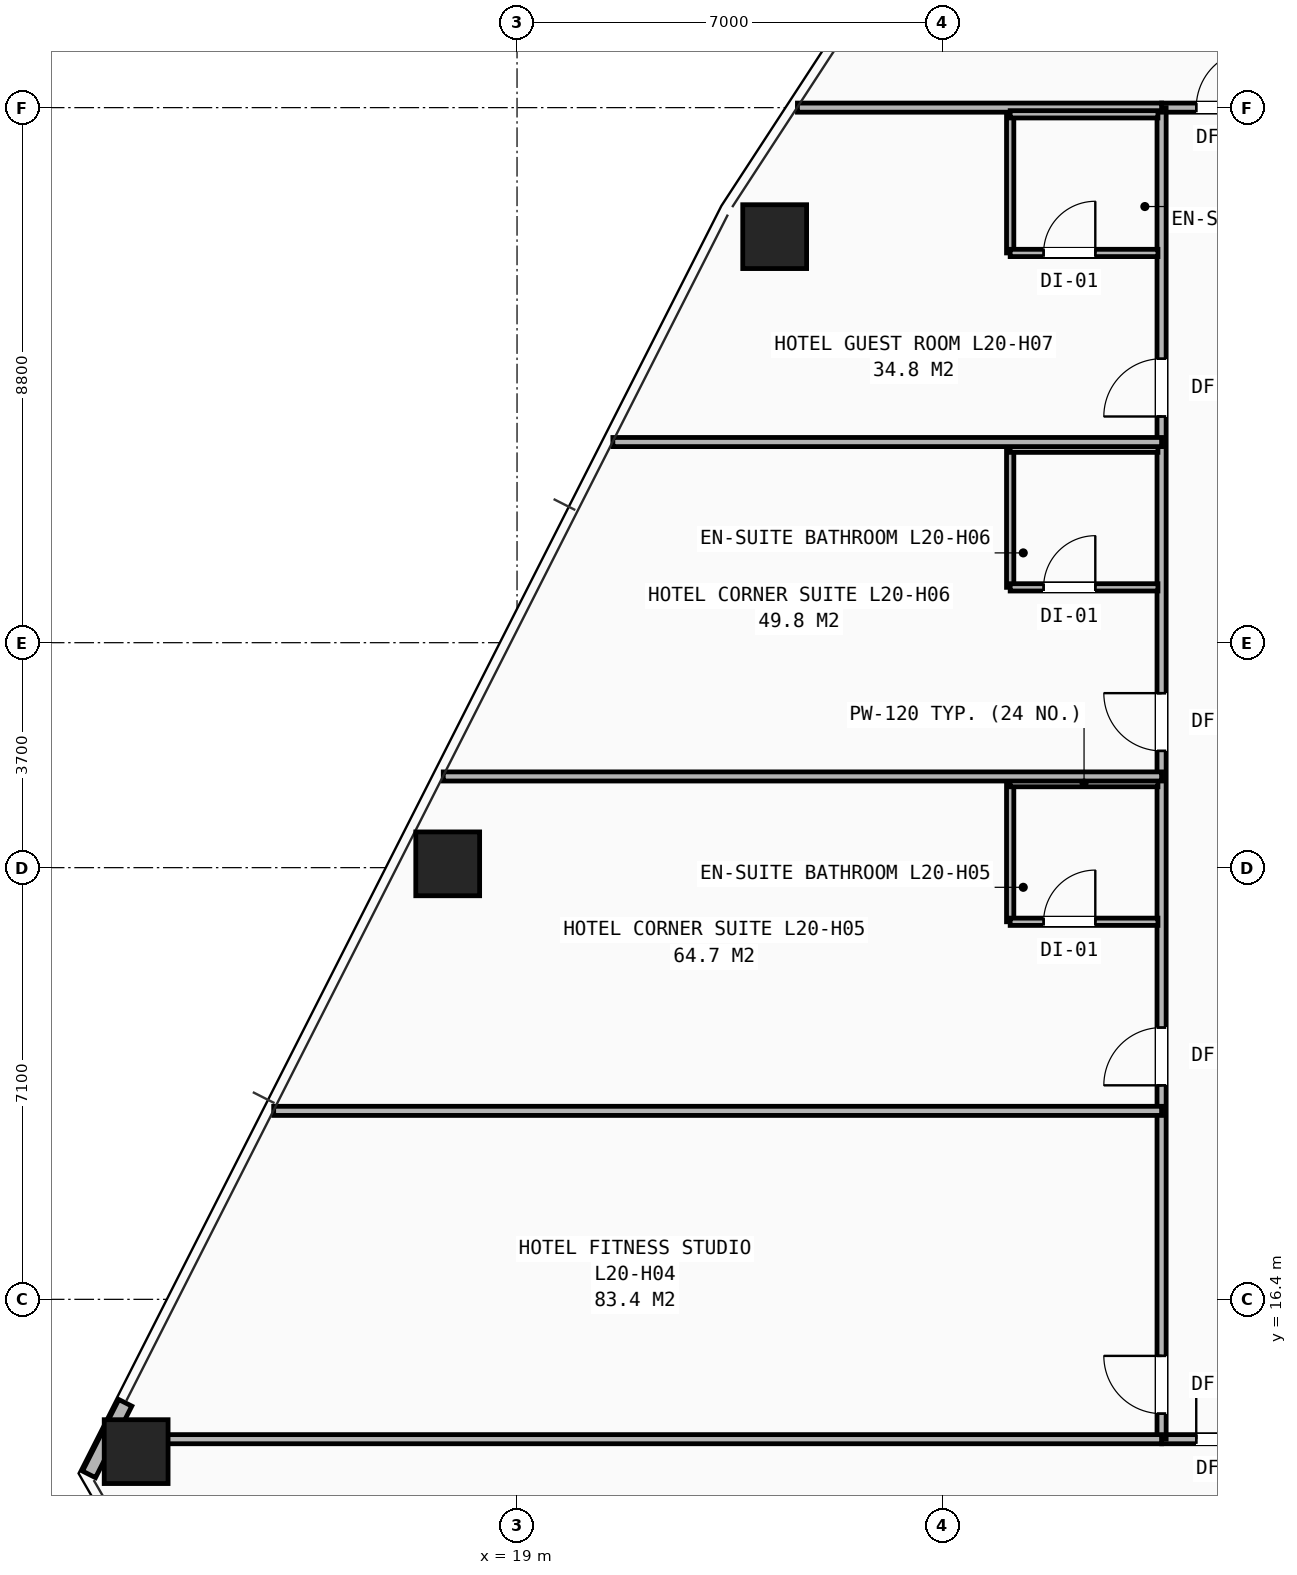
"""IFC4 building model, lengths in metres.
Left out: names, types, materials, properties, quantities, classifications, styles, units other than length and angle.
Written with IfcOpenShell. Run it as: python <this file> out.ifc"""

import sys

from ifc_helpers import new_model, si_unit, direction, frame, frame_2d, origin, origin_2d, place, context, subcontext, project, spatial, rectangle, hollow_rectangle, extrude, element, fill, save


model = new_model("IFC4")
c1 = context("Model", 3, precision=1e-05, world=origin(), true_north=direction((0.0, 1.0)))
c2 = subcontext(c1, "Body", "Model", "MODEL_VIEW")
j1 = project(units=[si_unit("LENGTHUNIT", "METRE"), si_unit("PLANEANGLEUNIT", "RADIAN")], contexts=[c1])
p1 = place(None, origin())
s1 = spatial("IfcSite", under=j1, at=p1, CompositionType="ELEMENT")
p2 = place(p1, origin())
s2 = spatial("IfcBuilding", under=s1, at=p2, CompositionType="ELEMENT")
p3 = place(p2, frame((0.0, 0.0, 73.4)))
s3 = spatial("IfcBuildingStorey", under=s2, at=p3, CompositionType="ELEMENT", Elevation=73.4)
for number, where, z_axis, x_axis in (
    (1, (23.237, 33.878, 0.0), (0.0, 0.0, 1.0), (1.0, 0.0, 0.0)),
    (2, (17.86, 23.563, 0.0), (0.0, 0.0, 1.0), (1.0, 0.0, 0.0)),
    (3, (12.736, 13.896, 0.0), (0.0, 0.0, 1.0), (1.0, 0.0, 0.0)),
):
    element("IfcColumn", number, at=place(p3, frame(where, z_axis=z_axis, x_axis=x_axis)), inside=s3, PredefinedType="COLUMN", context=c2, shape_type="SweptSolid", body=[
        extrude(hollow_rectangle(XDim=1.05, YDim=1.05, WallThickness=0.07, at=origin_2d()), origin(), (0.0, 0.0, 1.0), 3.2),
    ])
p4 = place(p3, frame((12.557, 14.698, 0.0), z_axis=(0.0, 0.0, 1.0), x_axis=(-0.452239623624, -0.891896475396, 0.0)))
e4 = element("IfcWall", 4, at=p4, inside=s3, PredefinedType="SHEAR", context=c2, shape_type="SweptSolid", body=[
    extrude(rectangle(XDim=1.319, YDim=0.24, at=frame_2d((0.66, 0.0))), origin(), (0.0, 0.0, 1.0), 2.253),
])
p5 = place(p3, frame((29.6, 14.1, 0.0), z_axis=(0.0, 0.0, 1.0), x_axis=(1.0, 0.0, 0.0)))
e5 = element("IfcWall", 5, at=p5, inside=s3, PredefinedType="PARTITIONING", context=c2, shape_type="SweptSolid", body=[
    extrude(rectangle(XDim=20.8, YDim=0.15, at=frame_2d((10.4, 0.0))), origin(), (0.0, 0.0, 1.0), 2.421),
])
p6 = place(p5, frame((0.57, 0.0, 0.0)))
e6 = element("IfcOpeningElement", 6, at=p6, cuts=e5, PredefinedType="OPENING", context=c2, shape_type="SweptSolid", body=[
    extrude(rectangle(XDim=0.95, YDim=2.1, at=frame_2d((0.475, 1.05))), frame((0.0, 0.085, 0.0), z_axis=(0.0, -1.0, 0.0), x_axis=(1.0, 0.0, 0.0)), (0.0, 0.0, 1.0), 0.17),
])
p7 = place(p5, frame((5.82, 0.0, 0.0)))
e7 = element("IfcOpeningElement", 7, at=p7, cuts=e5, PredefinedType="OPENING", context=c2, shape_type="SweptSolid", body=[
    extrude(rectangle(XDim=0.95, YDim=2.1, at=frame_2d((0.475, 1.05))), frame((0.0, 0.085, 0.0), z_axis=(0.0, -1.0, 0.0), x_axis=(1.0, 0.0, 0.0)), (0.0, 0.0, 1.0), 0.17),
])
p8 = place(p5, frame((15.02, 0.0, 0.0)))
e8 = element("IfcOpeningElement", 8, at=p8, cuts=e5, PredefinedType="OPENING", context=c2, shape_type="SweptSolid", body=[
    extrude(rectangle(XDim=0.95, YDim=2.1, at=frame_2d((0.475, 1.05))), frame((0.0, 0.085, 0.0), z_axis=(0.0, -1.0, 0.0), x_axis=(1.0, 0.0, 0.0)), (0.0, 0.0, 1.0), 0.17),
])
p9 = place(p3, frame((29.6, 36.0, 0.0), z_axis=(0.0, 0.0, 1.0), x_axis=(1.0, 0.0, 0.0)))
e9 = element("IfcWall", 9, at=p9, inside=s3, PredefinedType="PARTITIONING", context=c2, shape_type="SweptSolid", body=[
    extrude(rectangle(XDim=9.65, YDim=0.15, at=frame_2d((4.825, 0.0))), origin(), (0.0, 0.0, 1.0), 2.97),
])
p10 = place(p9, frame((0.57, 0.0, 0.0)))
e10 = element("IfcOpeningElement", 10, at=p10, cuts=e9, PredefinedType="OPENING", context=c2, shape_type="SweptSolid", body=[
    extrude(rectangle(XDim=0.95, YDim=2.1, at=frame_2d((0.475, 1.05))), frame((0.0, 0.085, 0.0), z_axis=(0.0, -1.0, 0.0), x_axis=(1.0, 0.0, 0.0)), (0.0, 0.0, 1.0), 0.17),
])
p11 = place(p9, frame((7.02, 0.0, 0.0)))
e11 = element("IfcOpeningElement", 11, at=p11, cuts=e9, PredefinedType="OPENING", context=c2, shape_type="SweptSolid", body=[
    extrude(rectangle(XDim=0.95, YDim=2.1, at=frame_2d((0.475, 1.05))), frame((0.0, 0.085, 0.0), z_axis=(0.0, -1.0, 0.0), x_axis=(1.0, 0.0, 0.0)), (0.0, 0.0, 1.0), 0.17),
])
p12 = place(p3, frame((29.6, 14.1, 0.0), z_axis=(0.0, 0.0, 1.0), x_axis=(0.0, 1.0, 0.0)))
e12 = element("IfcWall", 12, at=p12, inside=s3, PredefinedType="PARTITIONING", context=c2, shape_type="SweptSolid", body=[
    extrude(rectangle(XDim=21.9, YDim=0.15, at=frame_2d((10.95, 0.0))), origin(), (0.0, 0.0, 1.0), 2.421),
])
p13 = place(p12, frame((0.42, 0.0, 0.0)))
e13 = element("IfcOpeningElement", 13, at=p13, cuts=e12, PredefinedType="OPENING", context=c2, shape_type="SweptSolid", body=[
    extrude(rectangle(XDim=0.95, YDim=2.1, at=frame_2d((0.475, 1.05))), frame((0.0, 0.085, 0.0), z_axis=(0.0, -1.0, 0.0), x_axis=(1.0, 0.0, 0.0)), (0.0, 0.0, 1.0), 0.17),
])
p14 = place(p12, frame((5.82, 0.0, 0.0)))
e14 = element("IfcOpeningElement", 14, at=p14, cuts=e12, PredefinedType="OPENING", context=c2, shape_type="SweptSolid", body=[
    extrude(rectangle(XDim=0.95, YDim=2.1, at=frame_2d((0.475, 1.05))), frame((0.0, 0.085, 0.0), z_axis=(0.0, -1.0, 0.0), x_axis=(1.0, 0.0, 0.0)), (0.0, 0.0, 1.0), 0.17),
])
p15 = place(p12, frame((11.32, 0.0, 0.0)))
e15 = element("IfcOpeningElement", 15, at=p15, cuts=e12, PredefinedType="OPENING", context=c2, shape_type="SweptSolid", body=[
    extrude(rectangle(XDim=0.95, YDim=2.1, at=frame_2d((0.475, 1.05))), frame((0.0, 0.085, 0.0), z_axis=(0.0, -1.0, 0.0), x_axis=(1.0, 0.0, 0.0)), (0.0, 0.0, 1.0), 0.17),
])
p16 = place(p12, frame((16.82, 0.0, 0.0)))
e16 = element("IfcOpeningElement", 16, at=p16, cuts=e12, PredefinedType="OPENING", context=c2, shape_type="SweptSolid", body=[
    extrude(rectangle(XDim=0.95, YDim=2.1, at=frame_2d((0.475, 1.05))), frame((0.0, 0.085, 0.0), z_axis=(0.0, -1.0, 0.0), x_axis=(1.0, 0.0, 0.0)), (0.0, 0.0, 1.0), 0.17),
])
p17 = place(p3, frame((12.26, 14.1, 0.0), z_axis=(0.0, 0.0, 1.0), x_axis=(1.0, 0.0, 0.0)))
e17 = element("IfcWall", 17, at=p17, inside=s3, PredefinedType="PARTITIONING", context=c2, shape_type="SweptSolid", body=[
    extrude(rectangle(XDim=17.341, YDim=0.15, at=frame_2d((8.67, 0.0))), origin(), (0.0, 0.0, 1.0), 2.258),
])
p18 = place(p3, frame((23.611, 36.0, 0.0), z_axis=(0.0, 0.0, 1.0), x_axis=(1.0, 0.0, 0.0)))
e18 = element("IfcWall", 18, at=p18, inside=s3, PredefinedType="PARTITIONING", context=c2, shape_type="SweptSolid", body=[
    extrude(rectangle(XDim=5.989, YDim=0.15, at=frame_2d((2.994, 0.0))), origin(), (0.0, 0.0, 1.0), 2.258),
])
p19 = place(p3, frame((14.998, 19.5, 0.0), z_axis=(0.0, 0.0, 1.0), x_axis=(1.0, 0.0, 0.0)))
e19 = element("IfcWall", 19, at=p19, inside=s3, PredefinedType="PARTITIONING", context=c2, shape_type="SweptSolid", body=[
    extrude(rectangle(XDim=14.602, YDim=0.15, at=frame_2d((7.301, 0.0))), origin(), (0.0, 0.0, 1.0), 2.258),
])
p20 = place(p3, frame((27.11, 22.61, 0.0), z_axis=(0.0, 0.0, 1.0), x_axis=(0.0, 1.0, 0.0)))
e20 = element("IfcWall", 20, at=p20, inside=s3, PredefinedType="PARTITIONING", context=c2, shape_type="SweptSolid", body=[
    extrude(rectangle(XDim=2.28, YDim=0.12, at=frame_2d((1.14, 0.0))), origin(), (0.0, 0.0, 1.0), 2.97),
])
p21 = place(p3, frame((27.11, 22.61, 0.0), z_axis=(0.0, 0.0, 1.0), x_axis=(1.0, 0.0, 0.0)))
e21 = element("IfcWall", 21, at=p21, inside=s3, PredefinedType="PARTITIONING", context=c2, shape_type="SweptSolid", body=[
    extrude(rectangle(XDim=2.43, YDim=0.12, at=frame_2d((1.215, 0.0))), origin(), (0.0, 0.0, 1.0), 2.97),
])
p22 = place(p21, frame((0.55, 0.0, 0.0)))
e22 = element("IfcOpeningElement", 22, at=p22, cuts=e21, PredefinedType="OPENING", context=c2, shape_type="SweptSolid", body=[
    extrude(rectangle(XDim=0.85, YDim=2.05, at=frame_2d((0.425, 1.025))), frame((0.0, 0.07, 0.0), z_axis=(0.0, -1.0, 0.0), x_axis=(1.0, 0.0, 0.0)), (0.0, 0.0, 1.0), 0.14),
])
p23 = place(p3, frame((27.11, 24.89, 0.0), z_axis=(0.0, 0.0, 1.0), x_axis=(1.0, 0.0, 0.0)))
e23 = element("IfcWall", 23, at=p23, inside=s3, PredefinedType="PARTITIONING", context=c2, shape_type="SweptSolid", body=[
    extrude(rectangle(XDim=2.43, YDim=0.12, at=frame_2d((1.215, 0.0))), origin(), (0.0, 0.0, 1.0), 2.97),
])
p24 = place(p3, frame((17.787, 25.0, 0.0), z_axis=(0.0, 0.0, 1.0), x_axis=(1.0, 0.0, 0.0)))
e24 = element("IfcWall", 24, at=p24, inside=s3, PredefinedType="PARTITIONING", context=c2, shape_type="SweptSolid", body=[
    extrude(rectangle(XDim=11.813, YDim=0.15, at=frame_2d((5.907, 0.0))), origin(), (0.0, 0.0, 1.0), 2.258),
])
p25 = place(p3, frame((27.11, 28.11, 0.0), z_axis=(0.0, 0.0, 1.0), x_axis=(0.0, 1.0, 0.0)))
e25 = element("IfcWall", 25, at=p25, inside=s3, PredefinedType="PARTITIONING", context=c2, shape_type="SweptSolid", body=[
    extrude(rectangle(XDim=2.28, YDim=0.12, at=frame_2d((1.14, 0.0))), origin(), (0.0, 0.0, 1.0), 2.97),
])
p26 = place(p3, frame((27.11, 28.11, 0.0), z_axis=(0.0, 0.0, 1.0), x_axis=(1.0, 0.0, 0.0)))
e26 = element("IfcWall", 26, at=p26, inside=s3, PredefinedType="PARTITIONING", context=c2, shape_type="SweptSolid", body=[
    extrude(rectangle(XDim=2.43, YDim=0.12, at=frame_2d((1.215, 0.0))), origin(), (0.0, 0.0, 1.0), 2.97),
])
p27 = place(p26, frame((0.55, 0.0, 0.0)))
e27 = element("IfcOpeningElement", 27, at=p27, cuts=e26, PredefinedType="OPENING", context=c2, shape_type="SweptSolid", body=[
    extrude(rectangle(XDim=0.85, YDim=2.05, at=frame_2d((0.425, 1.025))), frame((0.0, 0.07, 0.0), z_axis=(0.0, -1.0, 0.0), x_axis=(1.0, 0.0, 0.0)), (0.0, 0.0, 1.0), 0.14),
])
p28 = place(p3, frame((27.11, 30.39, 0.0), z_axis=(0.0, 0.0, 1.0), x_axis=(1.0, 0.0, 0.0)))
e28 = element("IfcWall", 28, at=p28, inside=s3, PredefinedType="PARTITIONING", context=c2, shape_type="SweptSolid", body=[
    extrude(rectangle(XDim=2.43, YDim=0.12, at=frame_2d((1.215, 0.0))), origin(), (0.0, 0.0, 1.0), 2.97),
])
p29 = place(p3, frame((20.576, 30.5, 0.0), z_axis=(0.0, 0.0, 1.0), x_axis=(1.0, 0.0, 0.0)))
e29 = element("IfcWall", 29, at=p29, inside=s3, PredefinedType="PARTITIONING", context=c2, shape_type="SweptSolid", body=[
    extrude(rectangle(XDim=9.024, YDim=0.15, at=frame_2d((4.512, 0.0))), origin(), (0.0, 0.0, 1.0), 2.258),
])
p30 = place(p3, frame((27.11, 33.61, 0.0), z_axis=(0.0, 0.0, 1.0), x_axis=(0.0, 1.0, 0.0)))
e30 = element("IfcWall", 30, at=p30, inside=s3, PredefinedType="PARTITIONING", context=c2, shape_type="SweptSolid", body=[
    extrude(rectangle(XDim=2.28, YDim=0.12, at=frame_2d((1.14, 0.0))), origin(), (0.0, 0.0, 1.0), 2.503),
])
p31 = place(p3, frame((27.11, 33.61, 0.0), z_axis=(0.0, 0.0, 1.0), x_axis=(1.0, 0.0, 0.0)))
e31 = element("IfcWall", 31, at=p31, inside=s3, PredefinedType="PARTITIONING", context=c2, shape_type="SweptSolid", body=[
    extrude(rectangle(XDim=2.43, YDim=0.12, at=frame_2d((1.215, 0.0))), origin(), (0.0, 0.0, 1.0), 2.503),
])
p32 = place(p31, frame((0.55, 0.0, 0.0)))
e32 = element("IfcOpeningElement", 32, at=p32, cuts=e31, PredefinedType="OPENING", context=c2, shape_type="SweptSolid", body=[
    extrude(rectangle(XDim=0.85, YDim=2.05, at=frame_2d((0.425, 1.025))), frame((0.0, 0.07, 0.0), z_axis=(0.0, -1.0, 0.0), x_axis=(1.0, 0.0, 0.0)), (0.0, 0.0, 1.0), 0.14),
])
p33 = place(p3, frame((27.11, 35.89, 0.0), z_axis=(0.0, 0.0, 1.0), x_axis=(1.0, 0.0, 0.0)))
e33 = element("IfcWall", 33, at=p33, inside=s3, PredefinedType="PARTITIONING", context=c2, shape_type="SweptSolid", body=[
    extrude(rectangle(XDim=2.43, YDim=0.12, at=frame_2d((1.215, 0.0))), origin(), (0.0, 0.0, 1.0), 2.503),
])
p34 = place(p6, origin())
e34 = element("IfcDoor", 34, at=p34, inside=s3, OperationType="SINGLE_SWING_LEFT", PredefinedType="DOOR", context=c2, shape_type="SweptSolid", body=[
    extrude(rectangle(XDim=0.95, YDim=2.1, at=frame_2d((0.475, 1.05))), frame((0.0, 0.025, 0.0), z_axis=(0.0, -1.0, 0.0), x_axis=(1.0, 0.0, 0.0)), (0.0, 0.0, 1.0), 0.05),
])
fill(e6, e34)
p35 = place(p13, origin())
e35 = element("IfcDoor", 35, at=p35, inside=s3, OperationType="SINGLE_SWING_RIGHT", PredefinedType="DOOR", context=c2, shape_type="SweptSolid", body=[
    extrude(rectangle(XDim=0.95, YDim=2.1, at=frame_2d((0.475, 1.05))), frame((0.0, 0.025, 0.0), z_axis=(0.0, -1.0, 0.0), x_axis=(1.0, 0.0, 0.0)), (0.0, 0.0, 1.0), 0.05),
])
fill(e13, e35)
p36 = place(p14, origin())
e36 = element("IfcDoor", 36, at=p36, inside=s3, OperationType="SINGLE_SWING_LEFT", PredefinedType="DOOR", context=c2, shape_type="SweptSolid", body=[
    extrude(rectangle(XDim=0.95, YDim=2.1, at=frame_2d((0.475, 1.05))), frame((0.0, 0.025, 0.0), z_axis=(0.0, -1.0, 0.0), x_axis=(1.0, 0.0, 0.0)), (0.0, 0.0, 1.0), 0.05),
])
fill(e14, e36)
p37 = place(p22, origin())
e37 = element("IfcDoor", 37, at=p37, inside=s3, OperationType="SINGLE_SWING_RIGHT", PredefinedType="DOOR", context=c2, shape_type="SweptSolid", body=[
    extrude(rectangle(XDim=0.85, YDim=2.05, at=frame_2d((0.425, 1.025))), frame((0.0, 0.025, 0.0), z_axis=(0.0, -1.0, 0.0), x_axis=(1.0, 0.0, 0.0)), (0.0, 0.0, 1.0), 0.05),
])
fill(e22, e37)
p38 = place(p15, origin())
e38 = element("IfcDoor", 38, at=p38, inside=s3, OperationType="SINGLE_SWING_RIGHT", PredefinedType="DOOR", context=c2, shape_type="SweptSolid", body=[
    extrude(rectangle(XDim=0.95, YDim=2.1, at=frame_2d((0.475, 1.05))), frame((0.0, 0.025, 0.0), z_axis=(0.0, -1.0, 0.0), x_axis=(1.0, 0.0, 0.0)), (0.0, 0.0, 1.0), 0.05),
])
fill(e15, e38)
p39 = place(p27, origin())
e39 = element("IfcDoor", 39, at=p39, inside=s3, OperationType="SINGLE_SWING_RIGHT", PredefinedType="DOOR", context=c2, shape_type="SweptSolid", body=[
    extrude(rectangle(XDim=0.85, YDim=2.05, at=frame_2d((0.425, 1.025))), frame((0.0, 0.025, 0.0), z_axis=(0.0, -1.0, 0.0), x_axis=(1.0, 0.0, 0.0)), (0.0, 0.0, 1.0), 0.05),
])
fill(e27, e39)
p40 = place(p16, origin())
e40 = element("IfcDoor", 40, at=p40, inside=s3, OperationType="SINGLE_SWING_LEFT", PredefinedType="DOOR", context=c2, shape_type="SweptSolid", body=[
    extrude(rectangle(XDim=0.95, YDim=2.1, at=frame_2d((0.475, 1.05))), frame((0.0, 0.025, 0.0), z_axis=(0.0, -1.0, 0.0), x_axis=(1.0, 0.0, 0.0)), (0.0, 0.0, 1.0), 0.05),
])
fill(e16, e40)
p41 = place(p32, origin())
e41 = element("IfcDoor", 41, at=p41, inside=s3, OperationType="SINGLE_SWING_RIGHT", PredefinedType="DOOR", context=c2, shape_type="SweptSolid", body=[
    extrude(rectangle(XDim=0.85, YDim=2.05, at=frame_2d((0.425, 1.025))), frame((0.0, 0.025, 0.0), z_axis=(0.0, -1.0, 0.0), x_axis=(1.0, 0.0, 0.0)), (0.0, 0.0, 1.0), 0.05),
])
fill(e32, e41)
p42 = place(p10, origin())
e42 = element("IfcDoor", 42, at=p42, inside=s3, OperationType="SINGLE_SWING_RIGHT", PredefinedType="DOOR", context=c2, shape_type="SweptSolid", body=[
    extrude(rectangle(XDim=0.95, YDim=2.1, at=frame_2d((0.475, 1.05))), frame((0.0, 0.025, 0.0), z_axis=(0.0, -1.0, 0.0), x_axis=(1.0, 0.0, 0.0)), (0.0, 0.0, 1.0), 0.05),
])
fill(e10, e42)
save(model, sys.argv[1])
